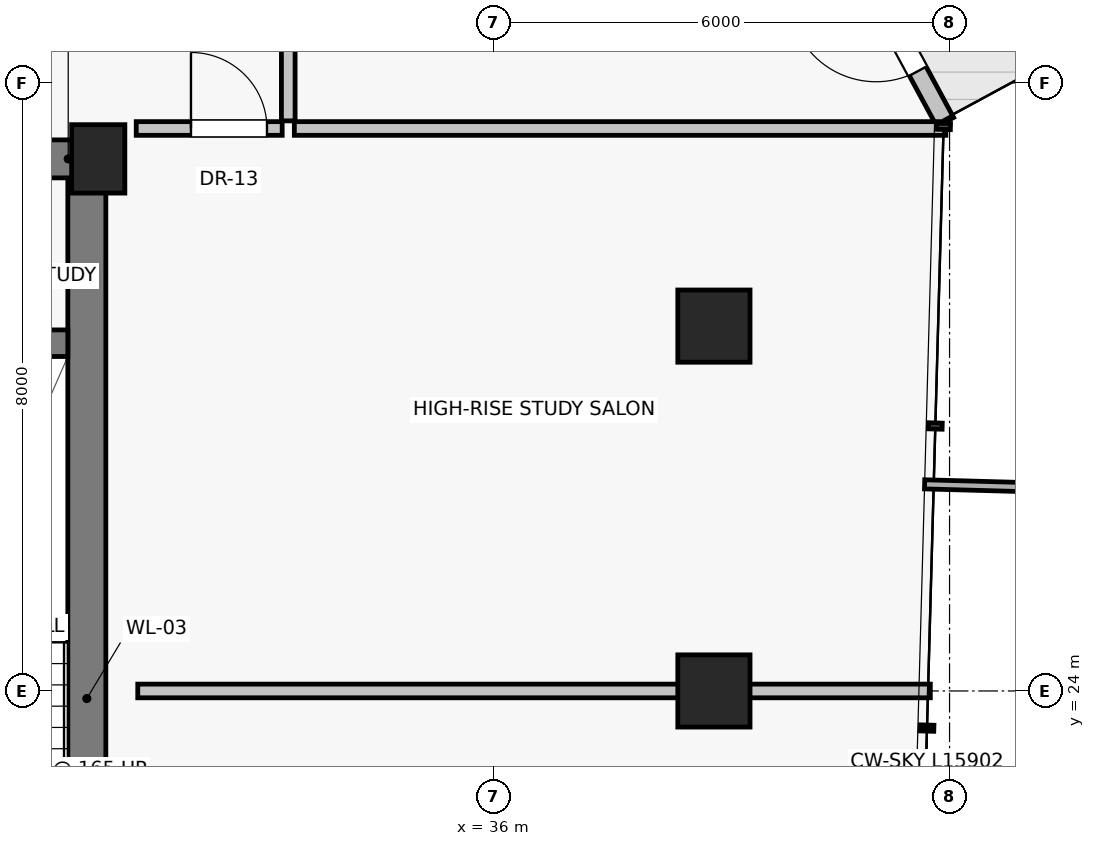
"""IFC4 building model, lengths in metres.
Left out: names, types, materials, properties, quantities, classifications, styles, units other than length and angle.
Written with IfcOpenShell. Run it as: python <this file> out.ifc"""

import sys

from ifc_helpers import new_model, si_unit, direction, frame, frame_2d, origin, origin_2d, place, context, subcontext, project, spatial, rectangle, extrude, source, transform, mapped, element, fill, save


model = new_model("IFC4")
c1 = context("Model", 3, precision=1e-05, world=origin(), true_north=direction((0.0, 1.0)))
c2 = subcontext(c1, "Body", "Model", "MODEL_VIEW")
j1 = project(units=[si_unit("LENGTHUNIT", "METRE"), si_unit("PLANEANGLEUNIT", "RADIAN")], contexts=[c1])
p1 = place(None, origin())
s1 = spatial("IfcSite", under=j1, at=p1, CompositionType="ELEMENT")
p2 = place(p1, origin())
s2 = spatial("IfcBuilding", under=s1, at=p2, CompositionType="ELEMENT")
p3 = place(p2, frame((0.0, 0.0, 211.35)))
s3 = spatial("IfcBuildingStorey", under=s2, at=p3, CompositionType="ELEMENT", Elevation=211.35)
p4 = place(p3, frame((30.8, 31.0, 0.0), z_axis=(0.0, 0.0, 1.0), x_axis=(1.0, 0.0, 0.0)))
e1 = element("IfcColumn", 1, at=p4, inside=s3, PredefinedType="PILASTER", context=c2, shape_type="SweptSolid", body=[
    extrude(rectangle(XDim=0.7, YDim=0.9, at=origin_2d()), origin(), (0.0, 0.0, 1.0), 4.3),
])
for number, where, z_axis, x_axis in (
    (2, (38.9, 24.0, 0.0), (0.0, 0.0, 1.0), (1.0, 0.0, 0.0)),
    (3, (38.9, 28.8, 0.0), (0.0, 0.0, 1.0), (1.0, 0.0, 0.0)),
):
    element("IfcColumn", number, at=place(p3, frame(where, z_axis=z_axis, x_axis=x_axis)), inside=s3, PredefinedType="COLUMN", context=c2, shape_type="SweptSolid", body=[
        extrude(rectangle(XDim=0.95, YDim=0.95, at=origin_2d()), origin(), (0.0, 0.0, 1.0), 4.3),
    ])
p5 = place(p3, frame((41.943, 31.485, 0.0), z_axis=(0.0, 0.0, 1.0), x_axis=(-0.475895309936, 0.879501935178, 0.0)))
e4 = element("IfcWall", 4, at=p5, inside=s3, PredefinedType="SOLIDWALL", context=c2, shape_type="SweptSolid", body=[
    extrude(rectangle(XDim=3.914, YDim=0.25, at=frame_2d((1.957, 0.0))), origin(), (0.0, 0.0, 1.0), 4.065),
])
p6 = place(p5, frame((0.76, 0.0, 0.0)))
e5 = element("IfcOpeningElement", 5, at=p6, cuts=e4, PredefinedType="OPENING", context=c2, shape_type="SweptSolid", body=[
    extrude(rectangle(XDim=1.15, YDim=2.25, at=frame_2d((0.575, 1.125))), frame((0.0, 0.135, 0.0), z_axis=(0.0, -1.0, 0.0), x_axis=(1.0, 0.0, 0.0)), (0.0, 0.0, 1.0), 0.27),
])
p7 = place(p3, frame((30.65, 16.8, 0.0), z_axis=(0.0, 0.0, 1.0), x_axis=(0.0, 1.0, 0.0)))
e6 = element("IfcWall", 6, at=p7, inside=s3, PredefinedType="SHEAR", context=c2, shape_type="SweptSolid", body=[
    extrude(rectangle(XDim=14.2, YDim=0.5, at=frame_2d((7.1, 0.0))), origin(), (0.0, 0.0, 1.0), 4.065),
])
p8 = place(p3, frame((27.0, 31.0, 0.0), z_axis=(0.0, 0.0, 1.0), x_axis=(1.0, 0.0, 0.0)))
e7 = element("IfcWall", 7, at=p8, inside=s3, PredefinedType="SHEAR", context=c2, shape_type="SweptSolid", body=[
    extrude(rectangle(XDim=3.8, YDim=0.5, at=frame_2d((1.9, 0.0))), origin(), (0.0, 0.0, 1.0), 4.065),
])
p9 = place(p8, frame((0.45, 0.0, 0.0)))
e8 = element("IfcOpeningElement", 8, at=p9, cuts=e7, PredefinedType="OPENING", context=c2, shape_type="SweptSolid", body=[
    extrude(rectangle(XDim=0.86, YDim=2.01, at=frame_2d((0.43, 1.005))), frame((0.0, 0.26, 0.0), z_axis=(0.0, -1.0, 0.0), x_axis=(1.0, 0.0, 0.0)), (0.0, 0.0, 1.0), 0.52),
])
p10 = place(p8, frame((1.9, 0.0, 0.0)))
e9 = element("IfcOpeningElement", 9, at=p10, cuts=e7, PredefinedType="OPENING", context=c2, shape_type="SweptSolid", body=[
    extrude(rectangle(XDim=0.86, YDim=2.01, at=frame_2d((0.43, 1.005))), frame((0.0, 0.26, 0.0), z_axis=(0.0, -1.0, 0.0), x_axis=(1.0, 0.0, 0.0)), (0.0, 0.0, 1.0), 0.52),
])
p11 = place(p3, frame((27.025, 28.575, 0.0), z_axis=(0.0, 0.0, 1.0), x_axis=(1.0, 0.0, 0.0)))
e10 = element("IfcWall", 10, at=p11, inside=s3, PredefinedType="SHEAR", context=c2, shape_type="SweptSolid", body=[
    extrude(rectangle(XDim=3.375, YDim=0.35, at=frame_2d((1.688, 0.0))), origin(), (0.0, 0.0, 1.0), 4.065),
])
p12 = place(p3, frame((31.32, 24.0, 0.0), z_axis=(0.0, 0.0, 1.0), x_axis=(1.0, 0.0, 0.0)))
e11 = element("IfcWall", 11, at=p12, inside=s3, PredefinedType="PARTITIONING", context=c2, shape_type="SweptSolid", body=[
    extrude(rectangle(XDim=10.427, YDim=0.18, at=frame_2d((5.213, 0.0))), origin(), (0.0, 0.0, 1.0), 4.065),
])
p13 = place(p3, frame((33.3, 31.5, 0.0), z_axis=(0.0, 0.0, 1.0), x_axis=(0.0, 1.0, 0.0)))
e12 = element("IfcWall", 12, at=p13, inside=s3, PredefinedType="PARTITIONING", context=c2, shape_type="SweptSolid", body=[
    extrude(rectangle(XDim=1.9, YDim=0.18, at=frame_2d((0.95, 0.0))), origin(), (0.0, 0.0, 1.0), 4.065),
])
p14 = place(p3, frame((31.3, 31.4, 0.0), z_axis=(0.0, 0.0, 1.0), x_axis=(1.0, 0.0, 0.0)))
e13 = element("IfcWall", 13, at=p14, inside=s3, PredefinedType="PARTITIONING", context=c2, shape_type="SweptSolid", body=[
    extrude(rectangle(XDim=1.92, YDim=0.18, at=frame_2d((0.96, 0.0))), origin(), (0.0, 0.0, 1.0), 3.286),
])
p15 = place(p14, frame((0.72, 0.0, 0.0)))
e14 = element("IfcOpeningElement", 14, at=p15, cuts=e13, PredefinedType="OPENING", context=c2, shape_type="SweptSolid", body=[
    extrude(rectangle(XDim=1.0, YDim=2.01, at=frame_2d((0.5, 1.005))), frame((0.0, 0.1, 0.0), z_axis=(0.0, -1.0, 0.0), x_axis=(1.0, 0.0, 0.0)), (0.0, 0.0, 1.0), 0.2),
])
p16 = place(p3, frame((33.38, 31.4, 0.0), z_axis=(0.0, 0.0, 1.0), x_axis=(1.0, 0.0, 0.0)))
e15 = element("IfcWall", 15, at=p16, inside=s3, PredefinedType="PARTITIONING", context=c2, shape_type="SweptSolid", body=[
    extrude(rectangle(XDim=8.571, YDim=0.18, at=frame_2d((4.286, 0.0))), origin(), (0.0, 0.0, 1.0), 4.065),
])
m1 = source(origin(), c2, "Body", "SweptSolid", [
    extrude(rectangle(XDim=1.15, YDim=2.25, at=frame_2d((0.575, 1.125))), frame((0.0, 0.025, 0.0), z_axis=(0.0, -1.0, 0.0), x_axis=(1.0, 0.0, 0.0)), (0.0, 0.0, 1.0), 0.05),
])
p17 = place(p6, frame((1.15, 0.0, 0.0), z_axis=(0.0, 0.0, 1.0), x_axis=(-1.0, 0.0, 0.0)))
e16 = element("IfcDoor", 16, at=p17, inside=s3, OperationType="SINGLE_SWING_RIGHT", PredefinedType="DOOR", context=c2, shape_type="MappedRepresentation", body=[
    mapped(m1, transform((0.0, 0.0, 0.0), scale=1.0)),
])
fill(e5, e16)
m2 = source(origin(), c2, "Body", "SweptSolid", [
    extrude(rectangle(XDim=1.0, YDim=2.01, at=frame_2d((0.5, 1.005))), frame((0.0, 0.025, 0.0), z_axis=(0.0, -1.0, 0.0), x_axis=(1.0, 0.0, 0.0)), (0.0, 0.0, 1.0), 0.05),
])
p18 = place(p15, origin())
e17 = element("IfcDoor", 17, at=p18, inside=s3, OperationType="SINGLE_SWING_LEFT", PredefinedType="DOOR", context=c2, shape_type="MappedRepresentation", body=[
    mapped(m2, transform((0.0, 0.0, 0.0), scale=1.0)),
])
fill(e14, e17)
save(model, sys.argv[1])
